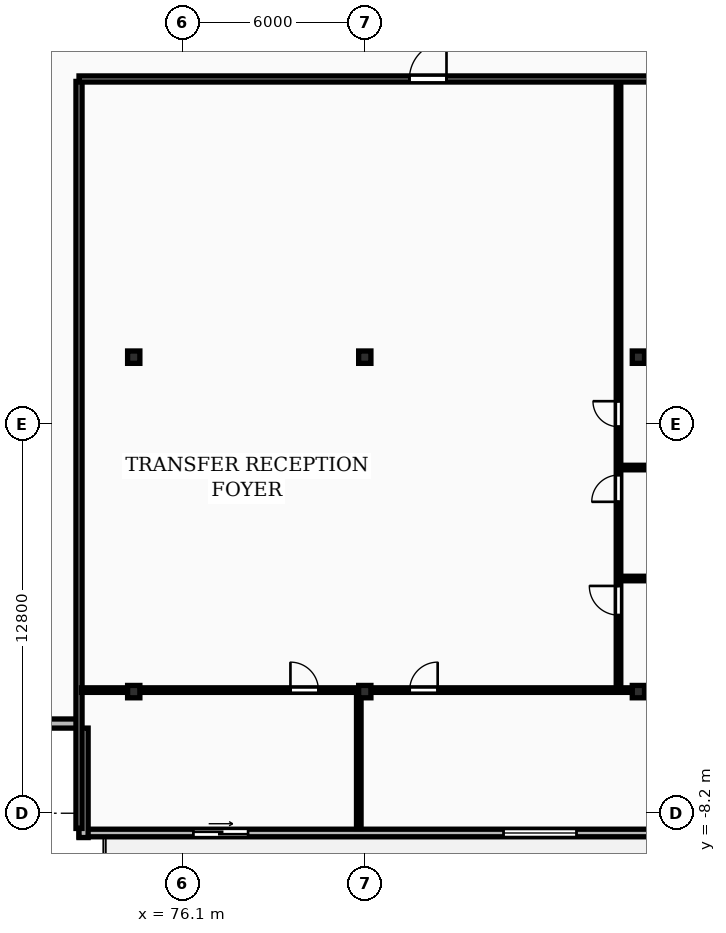
"""IFC4 building model, lengths in metres.
Left out: names, types, materials, properties, quantities, classifications, styles, units other than length and angle.
Written with IfcOpenShell. Run it as: python <this file> out.ifc"""

import sys

from ifc_helpers import new_model, si_unit, direction, frame, frame_2d, origin, origin_2d, place, context, subcontext, project, spatial, rectangle, i_section, extrude, element, fill, save


model = new_model("IFC4")
c1 = context("Model", 3, precision=1e-05, world=origin(), true_north=direction((0.0, 1.0)))
c2 = subcontext(c1, "Body", "Model", "MODEL_VIEW")
j1 = project(units=[si_unit("LENGTHUNIT", "METRE"), si_unit("PLANEANGLEUNIT", "RADIAN")], contexts=[c1])
p1 = place(None, origin())
s1 = spatial("IfcSite", under=j1, at=p1, CompositionType="ELEMENT")
p2 = place(p1, origin())
s2 = spatial("IfcBuilding", under=s1, at=p2, CompositionType="ELEMENT")
p3 = place(p2, frame((0.0, 0.0, 150.1)))
s3 = spatial("IfcBuildingStorey", under=s2, at=p3, CompositionType="ELEMENT", Elevation=150.1)
for number, where, z_axis, x_axis in (
    (1, (74.5, -4.2, 0.0), (0.0, 0.0, 1.0), (1.0, 0.0, 0.0)),
    (2, (74.5, 6.8, 0.0), (0.0, 0.0, 1.0), (1.0, 0.0, 0.0)),
    (3, (82.1, -4.2, 0.0), (0.0, 0.0, 1.0), (1.0, 0.0, 0.0)),
    (4, (82.1, 6.8, 0.0), (0.0, 0.0, 1.0), (1.0, 0.0, 0.0)),
    (5, (91.1, -4.2, 0.0), (0.0, 0.0, 1.0), (1.0, 0.0, 0.0)),
    (6, (91.1, 6.8, 0.0), (0.0, 0.0, 1.0), (1.0, 0.0, 0.0)),
):
    element("IfcColumn", number, at=place(p3, frame(where, z_axis=z_axis, x_axis=x_axis)), inside=s3, PredefinedType="COLUMN", context=c2, shape_type="SweptSolid", body=[
        extrude(i_section(OverallWidth=0.403, OverallDepth=0.406, WebThickness=0.027, FlangeThickness=0.043, FilletRadius=0.015, at=origin_2d()), origin(), (0.0, 0.0, 1.0), 3.6),
    ])
p4 = place(p3, frame((72.7, -8.85, 0.0), z_axis=(0.0, 0.0, 1.0), x_axis=(1.0, 0.0, 0.0)))
e7 = element("IfcWall", 7, at=p4, inside=s3, PredefinedType="STANDARD", context=c2, shape_type="SweptSolid", body=[
    extrude(rectangle(XDim=58.0, YDim=0.25, at=frame_2d((29.0, 0.0))), origin(), (0.0, 0.0, 1.0), 3.31),
])
p5 = place(p4, frame((3.761, 0.0, 0.0)))
e8 = element("IfcOpeningElement", 8, at=p5, cuts=e7, PredefinedType="OPENING", context=c2, shape_type="SweptSolid", body=[
    extrude(rectangle(XDim=1.8, YDim=2.2, at=frame_2d((0.9, 1.1))), frame((0.0, 0.135, 0.0), z_axis=(0.0, -1.0, 0.0), x_axis=(1.0, 0.0, 0.0)), (0.0, 0.0, 1.0), 0.27),
])
p6 = place(p4, frame((13.964, 0.0, 0.85)))
e9 = element("IfcOpeningElement", 9, at=p6, cuts=e7, PredefinedType="OPENING", context=c2, shape_type="SweptSolid", body=[
    extrude(rectangle(XDim=2.4, YDim=1.9, at=frame_2d((1.2, 0.95))), frame((0.0, 0.135, 0.0), z_axis=(0.0, -1.0, 0.0), x_axis=(1.0, 0.0, 0.0)), (0.0, 0.0, 1.0), 0.27),
])
p7 = place(p4, frame((25.138, 0.0, 0.0)))
e10 = element("IfcOpeningElement", 10, at=p7, cuts=e7, PredefinedType="OPENING", context=c2, shape_type="SweptSolid", body=[
    extrude(rectangle(XDim=1.8, YDim=2.2, at=frame_2d((0.9, 1.1))), frame((0.0, 0.135, 0.0), z_axis=(0.0, -1.0, 0.0), x_axis=(1.0, 0.0, 0.0)), (0.0, 0.0, 1.0), 0.27),
])
p8 = place(p4, frame((35.489, 0.0, 0.85)))
e11 = element("IfcOpeningElement", 11, at=p8, cuts=e7, PredefinedType="OPENING", context=c2, shape_type="SweptSolid", body=[
    extrude(rectangle(XDim=2.4, YDim=1.9, at=frame_2d((1.2, 0.95))), frame((0.0, 0.135, 0.0), z_axis=(0.0, -1.0, 0.0), x_axis=(1.0, 0.0, 0.0)), (0.0, 0.0, 1.0), 0.27),
])
p9 = place(p4, frame((47.713, 0.0, 0.0)))
e12 = element("IfcOpeningElement", 12, at=p9, cuts=e7, PredefinedType="OPENING", context=c2, shape_type="SweptSolid", body=[
    extrude(rectangle(XDim=1.8, YDim=2.2, at=frame_2d((0.9, 1.1))), frame((0.0, 0.135, 0.0), z_axis=(0.0, -1.0, 0.0), x_axis=(1.0, 0.0, 0.0)), (0.0, 0.0, 1.0), 0.27),
])
p10 = place(p4, frame((54.9, 0.0, 0.85)))
e13 = element("IfcOpeningElement", 13, at=p10, cuts=e7, PredefinedType="OPENING", context=c2, shape_type="SweptSolid", body=[
    extrude(rectangle(XDim=2.4, YDim=1.9, at=frame_2d((1.2, 0.95))), frame((0.0, 0.135, 0.0), z_axis=(0.0, -1.0, 0.0), x_axis=(1.0, 0.0, 0.0)), (0.0, 0.0, 1.0), 0.27),
])
p11 = place(p3, frame((69.1, -5.25, 0.0), z_axis=(0.0, 0.0, 1.0), x_axis=(1.0, 0.0, 0.0)))
e14 = element("IfcWall", 14, at=p11, inside=s3, PredefinedType="STANDARD", context=c2, shape_type="SweptSolid", body=[
    extrude(rectangle(XDim=3.6, YDim=0.3, at=frame_2d((1.8, 0.0))), origin(), (0.0, 0.0, 1.0), 3.31),
])
p12 = place(p3, frame((72.85, -5.4, 0.0), z_axis=(0.0, 0.0, 1.0), x_axis=(0.0, -1.0, 0.0)))
e15 = element("IfcWall", 15, at=p12, inside=s3, PredefinedType="STANDARD", context=c2, shape_type="SweptSolid", body=[
    extrude(rectangle(XDim=3.6, YDim=0.3, at=frame_2d((1.8, 0.0))), origin(), (0.0, 0.0, 1.0), 3.31),
])
p13 = place(p3, frame((72.7, -8.7, 0.0), z_axis=(0.0, 0.0, 1.0), x_axis=(0.0, 1.0, 0.0)))
e16 = element("IfcWall", 16, at=p13, inside=s3, PredefinedType="PARTITIONING", context=c2, shape_type="SweptSolid", body=[
    extrude(rectangle(XDim=24.57, YDim=0.2, at=frame_2d((12.285, 0.0))), origin(), (0.0, 0.0, 1.0), 3.31),
])
for number, where, z_axis, x_axis in (
    (17, (90.506, -0.48, 0.0), (0.0, 0.0, 1.0), (1.0, 0.0, 0.0)),
    (18, (90.506, 3.17, 0.0), (0.0, 0.0, 1.0), (1.0, 0.0, 0.0)),
):
    element("IfcWall", number, at=place(p3, frame(where, z_axis=z_axis, x_axis=x_axis)), inside=s3, PredefinedType="PARTITIONING", context=c2, shape_type="SweptSolid", body=[
        extrude(rectangle(XDim=3.36, YDim=0.15, at=frame_2d((1.68, 0.0))), origin(), (0.0, 0.0, 1.0), 3.31),
    ])
p14 = place(p3, frame((90.446, -4.09, 0.0), z_axis=(0.0, 0.0, 1.0), x_axis=(0.0, 1.0, 0.0)))
e19 = element("IfcWall", 19, at=p14, inside=s3, PredefinedType="PARTITIONING", context=c2, shape_type="SweptSolid", body=[
    extrude(rectangle(XDim=19.98, YDim=0.15, at=frame_2d((9.99, 0.0))), origin(), (0.0, 0.0, 1.0), 3.31),
])
p15 = place(p14, frame((2.406, 0.0, 0.0)))
e20 = element("IfcOpeningElement", 20, at=p15, cuts=e19, PredefinedType="OPENING", context=c2, shape_type="SweptSolid", body=[
    extrude(rectangle(XDim=0.96, YDim=2.1, at=frame_2d((0.48, 1.05))), frame((0.0, 0.085, 0.0), z_axis=(0.0, -1.0, 0.0), x_axis=(1.0, 0.0, 0.0)), (0.0, 0.0, 1.0), 0.17),
])
p16 = place(p14, frame((6.133, 0.0, 0.0)))
e21 = element("IfcOpeningElement", 21, at=p16, cuts=e19, PredefinedType="OPENING", context=c2, shape_type="SweptSolid", body=[
    extrude(rectangle(XDim=0.88, YDim=2.06, at=frame_2d((0.44, 1.03))), frame((0.0, 0.085, 0.0), z_axis=(0.0, -1.0, 0.0), x_axis=(1.0, 0.0, 0.0)), (0.0, 0.0, 1.0), 0.17),
])
p17 = place(p14, frame((8.602, 0.0, 0.0)))
e22 = element("IfcOpeningElement", 22, at=p17, cuts=e19, PredefinedType="OPENING", context=c2, shape_type="SweptSolid", body=[
    extrude(rectangle(XDim=0.84, YDim=2.04, at=frame_2d((0.42, 1.02))), frame((0.0, 0.085, 0.0), z_axis=(0.0, -1.0, 0.0), x_axis=(1.0, 0.0, 0.0)), (0.0, 0.0, 1.0), 0.17),
])
p18 = place(p3, frame((81.903, -8.7, 0.0), z_axis=(0.0, 0.0, 1.0), x_axis=(0.0, 1.0, 0.0)))
e23 = element("IfcWall", 23, at=p18, inside=s3, PredefinedType="PARTITIONING", context=c2, shape_type="SweptSolid", body=[
    extrude(rectangle(XDim=4.47, YDim=0.15, at=frame_2d((2.235, 0.0))), origin(), (0.0, 0.0, 1.0), 3.31),
])
p19 = place(p3, frame((72.78, -4.15, 0.0), z_axis=(0.0, 0.0, 1.0), x_axis=(1.0, 0.0, 0.0)))
e24 = element("IfcWall", 24, at=p19, inside=s3, PredefinedType="PARTITIONING", context=c2, shape_type="SweptSolid", body=[
    extrude(rectangle(XDim=21.085, YDim=0.15, at=frame_2d((10.543, 0.0))), origin(), (0.0, 0.0, 1.0), 3.003),
])
p20 = place(p19, frame((6.874, 0.0, 0.0)))
e25 = element("IfcOpeningElement", 25, at=p20, cuts=e24, PredefinedType="OPENING", context=c2, shape_type="SweptSolid", body=[
    extrude(rectangle(XDim=0.92, YDim=2.08, at=frame_2d((0.46, 1.04))), frame((0.0, 0.085, 0.0), z_axis=(0.0, -1.0, 0.0), x_axis=(1.0, 0.0, 0.0)), (0.0, 0.0, 1.0), 0.17),
])
p21 = place(p19, frame((10.797, 0.0, 0.0)))
e26 = element("IfcOpeningElement", 26, at=p21, cuts=e24, PredefinedType="OPENING", context=c2, shape_type="SweptSolid", body=[
    extrude(rectangle(XDim=0.92, YDim=2.08, at=frame_2d((0.46, 1.04))), frame((0.0, 0.085, 0.0), z_axis=(0.0, -1.0, 0.0), x_axis=(1.0, 0.0, 0.0)), (0.0, 0.0, 1.0), 0.17),
])
p22 = place(p3, frame((72.7, 15.95, 0.0), z_axis=(0.0, 0.0, 1.0), x_axis=(1.0, 0.0, 0.0)))
e27 = element("IfcWall", 27, at=p22, inside=s3, PredefinedType="PARTITIONING", context=c2, shape_type="SweptSolid", body=[
    extrude(rectangle(XDim=58.0, YDim=0.2, at=frame_2d((29.0, 0.0))), origin(), (0.0, 0.0, 1.0), 3.31),
])
p23 = place(p22, frame((10.868, 0.0, 0.0)))
e28 = element("IfcOpeningElement", 28, at=p23, cuts=e27, PredefinedType="OPENING", context=c2, shape_type="SweptSolid", body=[
    extrude(rectangle(XDim=1.22, YDim=2.18, at=frame_2d((0.61, 1.09))), frame((0.0, 0.11, 0.0), z_axis=(0.0, -1.0, 0.0), x_axis=(1.0, 0.0, 0.0)), (0.0, 0.0, 1.0), 0.22),
])
p24 = place(p22, frame((30.441, 0.0, 0.0)))
e29 = element("IfcOpeningElement", 29, at=p24, cuts=e27, PredefinedType="OPENING", context=c2, shape_type="SweptSolid", body=[
    extrude(rectangle(XDim=1.22, YDim=2.18, at=frame_2d((0.61, 1.09))), frame((0.0, 0.11, 0.0), z_axis=(0.0, -1.0, 0.0), x_axis=(1.0, 0.0, 0.0)), (0.0, 0.0, 1.0), 0.22),
])
p25 = place(p22, frame((44.831, 0.0, 0.0)))
e30 = element("IfcOpeningElement", 30, at=p25, cuts=e27, PredefinedType="OPENING", context=c2, shape_type="SweptSolid", body=[
    extrude(rectangle(XDim=0.95, YDim=2.15, at=frame_2d((0.475, 1.075))), frame((0.0, 0.11, 0.0), z_axis=(0.0, -1.0, 0.0), x_axis=(1.0, 0.0, 0.0)), (0.0, 0.0, 1.0), 0.22),
])
p26 = place(p5, origin())
e31 = element("IfcDoor", 31, at=p26, inside=s3, OperationType="SLIDING_TO_RIGHT", PredefinedType="DOOR", context=c2, shape_type="SweptSolid", body=[
    extrude(rectangle(XDim=1.8, YDim=2.2, at=frame_2d((0.9, 1.1))), frame((0.0, 0.025, 0.0), z_axis=(0.0, -1.0, 0.0), x_axis=(1.0, 0.0, 0.0)), (0.0, 0.0, 1.0), 0.05),
])
fill(e8, e31)
p27 = place(p6, origin())
e32 = element("IfcWindow", 32, at=p27, inside=s3, PartitioningType="DOUBLE_PANEL_VERTICAL", PredefinedType="WINDOW", context=c2, shape_type="SweptSolid", body=[
    extrude(rectangle(XDim=2.4, YDim=1.9, at=frame_2d((1.2, 0.95))), frame((0.0, 0.03, 0.0), z_axis=(0.0, -1.0, 0.0), x_axis=(1.0, 0.0, 0.0)), (0.0, 0.0, 1.0), 0.06),
])
fill(e9, e32)
p28 = place(p15, origin())
e33 = element("IfcDoor", 33, at=p28, inside=s3, OperationType="SINGLE_SWING_RIGHT", PredefinedType="DOOR", context=c2, shape_type="SweptSolid", body=[
    extrude(rectangle(XDim=0.96, YDim=2.1, at=frame_2d((0.48, 1.05))), frame((0.0, 0.025, 0.0), z_axis=(0.0, -1.0, 0.0), x_axis=(1.0, 0.0, 0.0)), (0.0, 0.0, 1.0), 0.05),
])
fill(e20, e33)
p29 = place(p16, origin())
e34 = element("IfcDoor", 34, at=p29, inside=s3, OperationType="SINGLE_SWING_LEFT", PredefinedType="DOOR", context=c2, shape_type="SweptSolid", body=[
    extrude(rectangle(XDim=0.88, YDim=2.06, at=frame_2d((0.44, 1.03))), frame((0.0, 0.025, 0.0), z_axis=(0.0, -1.0, 0.0), x_axis=(1.0, 0.0, 0.0)), (0.0, 0.0, 1.0), 0.05),
])
fill(e21, e34)
p30 = place(p17, origin())
e35 = element("IfcDoor", 35, at=p30, inside=s3, OperationType="SINGLE_SWING_RIGHT", PredefinedType="DOOR", context=c2, shape_type="SweptSolid", body=[
    extrude(rectangle(XDim=0.84, YDim=2.04, at=frame_2d((0.42, 1.02))), frame((0.0, 0.025, 0.0), z_axis=(0.0, -1.0, 0.0), x_axis=(1.0, 0.0, 0.0)), (0.0, 0.0, 1.0), 0.05),
])
fill(e22, e35)
p31 = place(p20, origin())
e36 = element("IfcDoor", 36, at=p31, inside=s3, OperationType="SINGLE_SWING_LEFT", PredefinedType="DOOR", context=c2, shape_type="SweptSolid", body=[
    extrude(rectangle(XDim=0.92, YDim=2.08, at=frame_2d((0.46, 1.04))), frame((0.0, 0.025, 0.0), z_axis=(0.0, -1.0, 0.0), x_axis=(1.0, 0.0, 0.0)), (0.0, 0.0, 1.0), 0.05),
])
fill(e25, e36)
p32 = place(p21, origin())
e37 = element("IfcDoor", 37, at=p32, inside=s3, OperationType="SINGLE_SWING_RIGHT", PredefinedType="DOOR", context=c2, shape_type="SweptSolid", body=[
    extrude(rectangle(XDim=0.92, YDim=2.08, at=frame_2d((0.46, 1.04))), frame((0.0, 0.025, 0.0), z_axis=(0.0, -1.0, 0.0), x_axis=(1.0, 0.0, 0.0)), (0.0, 0.0, 1.0), 0.05),
])
fill(e26, e37)
p33 = place(p23, origin())
e38 = element("IfcDoor", 38, at=p33, inside=s3, OperationType="SINGLE_SWING_RIGHT", PredefinedType="DOOR", context=c2, shape_type="SweptSolid", body=[
    extrude(rectangle(XDim=1.22, YDim=2.18, at=frame_2d((0.61, 1.09))), frame((0.0, 0.025, 0.0), z_axis=(0.0, -1.0, 0.0), x_axis=(1.0, 0.0, 0.0)), (0.0, 0.0, 1.0), 0.05),
])
fill(e28, e38)
save(model, sys.argv[1])
